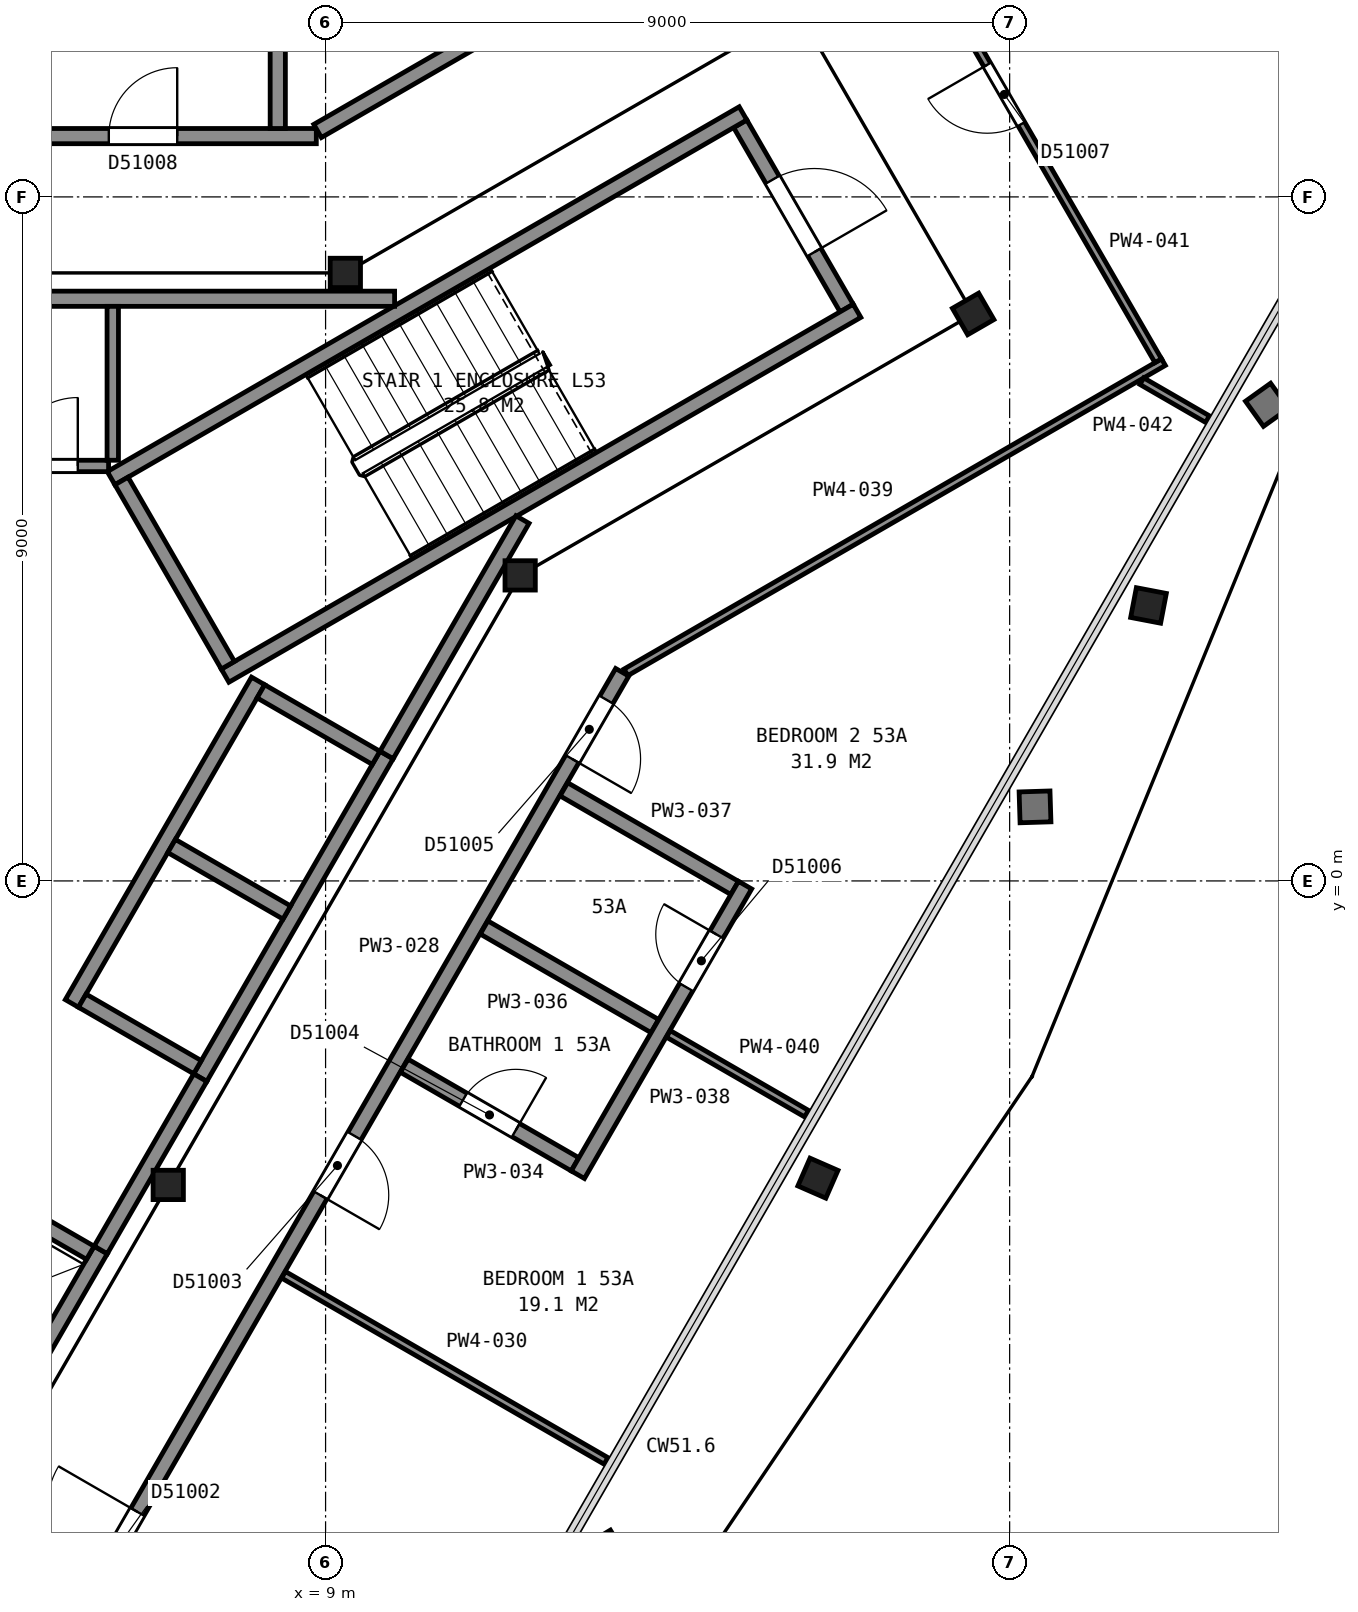
"""IFC4 building model, lengths in metres.
Left out: names, types, materials, properties, quantities, classifications, styles, units other than length and angle.
Written with IfcOpenShell. Run it as: python <this file> out.ifc"""

import sys

from ifc_helpers import new_model, si_unit, direction, frame, frame_2d, origin, origin_2d, place, context, subcontext, project, spatial, rectangle, i_section, extrude, element, fill, save


model = new_model("IFC4")
c1 = context("Model", 3, precision=1e-05, world=origin(), true_north=direction((0.0, 1.0)))
c2 = subcontext(c1, "Body", "Model", "MODEL_VIEW")
j1 = project(units=[si_unit("LENGTHUNIT", "METRE"), si_unit("PLANEANGLEUNIT", "RADIAN")], contexts=[c1])
p1 = place(None, origin())
s1 = spatial("IfcSite", under=j1, at=p1, CompositionType="ELEMENT")
p2 = place(p1, origin())
s2 = spatial("IfcBuilding", under=s1, at=p2, CompositionType="ELEMENT")
p3 = place(p2, frame((0.0, 0.0, 213.8)))
s3 = spatial("IfcBuildingStorey", under=s2, at=p3, CompositionType="ELEMENT", Elevation=213.8)
p4 = place(p3, frame((15.276, -3.823, 0.035), z_axis=(0.169909418079, -0.074413848602, 0.982646105566), x_axis=(-0.500226220169, -0.86564150205, 0.020940835345)))
e1 = element("IfcColumn", 1, at=p4, inside=s3, PredefinedType="COLUMN", context=c2, shape_type="SweptSolid", body=[
    extrude(i_section(OverallWidth=0.401, OverallDepth=0.399, WebThickness=0.025, FlangeThickness=0.04, FilletRadius=0.015, at=origin_2d()), origin(), (0.0, 0.0, 1.0), 3.694),
])
p5 = place(p3, frame((19.598, 3.668, 0.04), z_axis=(0.19341182923, -0.037095396991, 0.980416134015), x_axis=(-0.498932099925, -0.864144788984, 0.065730840066)))
e2 = element("IfcColumn", 2, at=p5, inside=s3, PredefinedType="COLUMN", context=c2, shape_type="SweptSolid", body=[
    extrude(i_section(OverallWidth=0.401, OverallDepth=0.399, WebThickness=0.025, FlangeThickness=0.04, FilletRadius=0.015, at=origin_2d()), origin(), (0.0, 0.0, 1.0), 3.692),
])
p6 = place(p3, frame((11.56, 4.02, 0.0), z_axis=(0.0, 0.0, 1.0), x_axis=(1.0, 0.0, 0.0)))
e3 = element("IfcColumn", 3, at=p6, inside=s3, PredefinedType="COLUMN", context=c2, shape_type="SweptSolid", body=[
    extrude(i_section(OverallWidth=0.399, OverallDepth=0.386, WebThickness=0.021, FlangeThickness=0.033, FilletRadius=0.015, at=origin_2d()), origin(), (0.0, 0.0, 1.0), 3.7),
])
p7 = place(p3, frame((17.52, 7.46, 0.0), z_axis=(0.0, 0.0, 1.0), x_axis=(0.5, -0.866025403784, 0.0)))
e4 = element("IfcColumn", 4, at=p7, inside=s3, PredefinedType="COLUMN", context=c2, shape_type="SweptSolid", body=[
    extrude(i_section(OverallWidth=0.401, OverallDepth=0.399, WebThickness=0.025, FlangeThickness=0.04, FilletRadius=0.015, at=origin_2d()), origin(), (0.0, 0.0, 1.0), 3.7),
])
for number, where, z_axis, x_axis in (
    (5, (9.26, 8.0, 0.0), (0.0, 0.0, 1.0), (1.0, 0.0, 0.0)),
    (6, (6.93, -4.0, 0.0), (0.0, 0.0, 1.0), (1.0, 0.0, 0.0)),
):
    element("IfcColumn", number, at=place(p3, frame(where, z_axis=z_axis, x_axis=x_axis)), inside=s3, PredefinedType="COLUMN", context=c2, shape_type="SweptSolid", body=[
        extrude(i_section(OverallWidth=0.399, OverallDepth=0.386, WebThickness=0.021, FlangeThickness=0.033, FilletRadius=0.015, at=origin_2d()), origin(), (0.0, 0.0, 1.0), 3.7),
    ])
p8 = place(p3, frame((15.855, 7.538, 0.0), z_axis=(0.0, 0.0, 1.0), x_axis=(-0.500049511043, 0.865996816683, 0.0)))
e7 = element("IfcWall", 7, at=p8, inside=s3, PredefinedType="PARTITIONING", context=c2, shape_type="SweptSolid", body=[
    extrude(rectangle(XDim=2.8, YDim=0.2, at=frame_2d((1.4, 0.0))), origin(), (0.0, 0.0, 1.0), 3.45),
])
p9 = place(p8, frame((0.85, 0.0, 0.0)))
e8 = element("IfcOpeningElement", 8, at=p9, cuts=e7, PredefinedType="OPENING", context=c2, shape_type="SweptSolid", body=[
    extrude(rectangle(XDim=1.1, YDim=2.1, at=frame_2d((0.55, 1.05))), frame((0.0, 0.11, 0.0), z_axis=(0.0, -1.0, 0.0), x_axis=(1.0, 0.0, 0.0)), (0.0, 0.0, 1.0), 0.22),
])
for number, where, z_axis, x_axis in (
    (9, (6.178, 5.299, 0.0), (0.0, 0.0, 1.0), (0.866, 0.5, 0.0)),
    (10, (7.678, 2.701, 0.0), (0.0, 0.0, 1.0), (0.866, 0.5, 0.0)),
):
    element("IfcWall", number, at=place(p3, frame(where, z_axis=z_axis, x_axis=x_axis)), inside=s3, PredefinedType="PARTITIONING", context=c2, shape_type="SweptSolid", body=[
        extrude(rectangle(XDim=9.6, YDim=0.2, at=frame_2d((4.8, 0.0))), origin(), (0.0, 0.0, 1.0), 3.45),
    ])
p10 = place(p3, frame((7.715, 2.838, 0.0), z_axis=(0.0, 0.0, 1.0), x_axis=(-0.500049511043, 0.865996816683, 0.0)))
e11 = element("IfcWall", 11, at=p10, inside=s3, PredefinedType="PARTITIONING", context=c2, shape_type="SweptSolid", body=[
    extrude(rectangle(XDim=2.8, YDim=0.2, at=frame_2d((1.4, 0.0))), origin(), (0.0, 0.0, 1.0), 3.45),
])
p11 = place(p3, frame((4.766, -7.065, 0.0), z_axis=(0.0, 0.0, 1.0), x_axis=(0.499948979701, 0.866054858364, 0.0)))
e12 = element("IfcWall", 12, at=p11, inside=s3, PredefinedType="PARTITIONING", context=c2, shape_type="SweptSolid", body=[
    extrude(rectangle(XDim=2.55, YDim=0.2, at=frame_2d((1.275, 0.0))), origin(), (0.0, 0.0, 1.0), 3.7),
])
p12 = place(p3, frame((7.351, -2.587, 0.0), z_axis=(0.0, 0.0, 1.0), x_axis=(0.500002801628, 0.866023786258, 0.0)))
e13 = element("IfcWall", 13, at=p12, inside=s3, PredefinedType="PARTITIONING", context=c2, shape_type="SweptSolid", body=[
    extrude(rectangle(XDim=4.9, YDim=0.2, at=frame_2d((2.45, 0.0))), origin(), (0.0, 0.0, 1.0), 3.7),
])
p13 = place(p3, frame((5.663, -1.612, 0.0), z_axis=(0.0, 0.0, 1.0), x_axis=(0.49998122708, 0.866036242063, 0.0)))
e14 = element("IfcWall", 14, at=p13, inside=s3, PredefinedType="PARTITIONING", context=c2, shape_type="SweptSolid", body=[
    extrude(rectangle(XDim=4.9, YDim=0.2, at=frame_2d((2.45, 0.0))), origin(), (0.0, 0.0, 1.0), 3.7),
])
p14 = place(p3, frame((9.665, 1.62, 0.0), z_axis=(0.0, 0.0, 1.0), x_axis=(-0.866002029911, 0.500040482552, 0.0)))
e15 = element("IfcWall", 15, at=p14, inside=s3, PredefinedType="PARTITIONING", context=c2, shape_type="SweptSolid", body=[
    extrude(rectangle(XDim=1.75, YDim=0.2, at=frame_2d((0.875, 0.0))), origin(), (0.0, 0.0, 1.0), 3.7),
])
for number, where, z_axis, x_axis in (
    (16, (8.49, -0.416, 0.0), (0.0, 0.0, 1.0), (-0.866, 0.5, 0.0)),
    (17, (7.315, -2.451, 0.0), (0.0, 0.0, 1.0), (-0.866, 0.5, 0.0)),
):
    element("IfcWall", number, at=place(p3, frame(where, z_axis=z_axis, x_axis=x_axis)), inside=s3, PredefinedType="PARTITIONING", context=c2, shape_type="SweptSolid", body=[
        extrude(rectangle(XDim=1.75, YDim=0.2, at=frame_2d((0.875, 0.0))), origin(), (0.0, 0.0, 1.0), 3.7),
    ])
p15 = place(p3, frame((5.905, -4.893, 0.0), z_axis=(0.0, 0.0, 1.0), x_axis=(-0.866002029911, 0.500040482552, 0.0)))
e18 = element("IfcWall", 18, at=p15, inside=s3, PredefinedType="PARTITIONING", context=c2, shape_type="SweptSolid", body=[
    extrude(rectangle(XDim=1.75, YDim=0.2, at=frame_2d((0.875, 0.0))), origin(), (0.0, 0.0, 1.0), 3.7),
])
p16 = place(p3, frame((-3.933, 7.66, 0.0), z_axis=(0.0, 0.0, 1.0), x_axis=(1.0, 0.0, 0.0)))
e19 = element("IfcWall", 19, at=p16, inside=s3, PredefinedType="PARTITIONING", context=c2, shape_type="SweptSolid", body=[
    extrude(rectangle(XDim=13.841, YDim=0.2, at=frame_2d((6.92, 0.0))), origin(), (0.0, 0.0, 1.0), 3.45),
])
p17 = place(p3, frame((0.925, 5.46, 0.0), z_axis=(0.0, 0.0, 1.0), x_axis=(1.0, 0.0, 0.0)))
e20 = element("IfcWall", 20, at=p17, inside=s3, PredefinedType="PARTITIONING", context=c2, shape_type="SweptSolid", body=[
    extrude(rectangle(XDim=5.22, YDim=0.15, at=frame_2d((2.61, 0.0))), origin(), (0.0, 0.0, 1.0), 3.45),
])
p18 = place(p17, frame((3.915, 0.0, 0.0)))
e21 = element("IfcOpeningElement", 21, at=p18, cuts=e20, PredefinedType="OPENING", context=c2, shape_type="SweptSolid", body=[
    extrude(rectangle(XDim=0.9, YDim=2.1, at=frame_2d((0.45, 1.05))), frame((0.0, 0.085, 0.0), z_axis=(0.0, -1.0, 0.0), x_axis=(1.0, 0.0, 0.0)), (0.0, 0.0, 1.0), 0.17),
])
p19 = place(p3, frame((6.042, -4.855, 0.0), z_axis=(0.0, 0.0, 1.0), x_axis=(0.500252727967, 0.865879442048, 0.0)))
e22 = element("IfcWall", 22, at=p19, inside=s3, PredefinedType="PARTITIONING", context=c2, shape_type="SweptSolid", body=[
    extrude(rectangle(XDim=2.617, YDim=0.2, at=frame_2d((1.309, 0.0))), origin(), (0.0, 0.0, 1.0), 3.45),
])
p20 = place(p3, frame((6.2, 5.535, 0.0), z_axis=(0.0, 0.0, 1.0), x_axis=(0.0, 1.0, 0.0)))
e23 = element("IfcWall", 23, at=p20, inside=s3, PredefinedType="PARTITIONING", context=c2, shape_type="SweptSolid", body=[
    extrude(rectangle(XDim=2.025, YDim=0.15, at=frame_2d((1.013, 0.0))), origin(), (0.0, 0.0, 1.0), 3.45),
])
p21 = place(p3, frame((9.803, 1.658, 0.0), z_axis=(0.0, 0.0, 1.0), x_axis=(0.499943114462, 0.866058244174, 0.0)))
e24 = element("IfcWall", 24, at=p21, inside=s3, PredefinedType="PARTITIONING", context=c2, shape_type="SweptSolid", body=[
    extrude(rectangle(XDim=3.576, YDim=0.2, at=frame_2d((1.788, 0.0))), origin(), (0.0, 0.0, 1.0), 3.45),
])
p22 = place(p3, frame((-8.828, 9.8, 0.0), z_axis=(0.0, 0.0, 1.0), x_axis=(1.0, 0.0, 0.0)))
e25 = element("IfcWall", 25, at=p22, inside=s3, PredefinedType="PARTITIONING", context=c2, shape_type="SweptSolid", body=[
    extrude(rectangle(XDim=17.706, YDim=0.2, at=frame_2d((8.853, 0.0))), origin(), (0.0, 0.0, 1.0), 2.713),
])
p23 = place(p22, frame((14.976, 0.0, 0.0)))
e26 = element("IfcOpeningElement", 26, at=p23, cuts=e25, PredefinedType="OPENING", context=c2, shape_type="SweptSolid", body=[
    extrude(rectangle(XDim=0.9, YDim=2.1, at=frame_2d((0.45, 1.05))), frame((0.0, 0.11, 0.0), z_axis=(0.0, -1.0, 0.0), x_axis=(1.0, 0.0, 0.0)), (0.0, 0.0, 1.0), 0.22),
])
p24 = place(p22, frame((10.673, 0.0, 0.0)))
e27 = element("IfcOpeningElement", 27, at=p24, cuts=e25, PredefinedType="OPENING", context=c2, shape_type="SweptSolid", body=[
    extrude(rectangle(XDim=0.9, YDim=2.1, at=frame_2d((0.45, 1.05))), frame((0.0, 0.11, 0.0), z_axis=(0.0, -1.0, 0.0), x_axis=(1.0, 0.0, 0.0)), (0.0, 0.0, 1.0), 0.22),
])
p25 = place(p22, frame((5.57, 0.0, 0.0)))
e28 = element("IfcOpeningElement", 28, at=p25, cuts=e25, PredefinedType="OPENING", context=c2, shape_type="SweptSolid", body=[
    extrude(rectangle(XDim=0.9, YDim=2.1, at=frame_2d((0.45, 1.05))), frame((0.0, 0.11, 0.0), z_axis=(0.0, -1.0, 0.0), x_axis=(1.0, 0.0, 0.0)), (0.0, 0.0, 1.0), 0.22),
])
p26 = place(p22, frame((1.3, 0.0, 0.0)))
e29 = element("IfcOpeningElement", 29, at=p26, cuts=e25, PredefinedType="OPENING", context=c2, shape_type="SweptSolid", body=[
    extrude(rectangle(XDim=0.9, YDim=2.1, at=frame_2d((0.45, 1.05))), frame((0.0, 0.11, 0.0), z_axis=(0.0, -1.0, 0.0), x_axis=(1.0, 0.0, 0.0)), (0.0, 0.0, 1.0), 0.22),
])
p27 = place(p3, frame((12.903, 2.745, 0.0), z_axis=(0.0, 0.0, 1.0), x_axis=(-0.499999743747, -0.866025551732, 0.0)))
e30 = element("IfcWall", 30, at=p27, inside=s3, PredefinedType="PARTITIONING", context=c2, shape_type="SweptSolid", body=[
    extrude(rectangle(XDim=17.656, YDim=0.2, at=frame_2d((8.828, 0.0))), origin(), (0.0, 0.0, 1.0), 2.713),
])
p28 = place(p27, frame((12.756, 0.0, 0.0)))
e31 = element("IfcOpeningElement", 31, at=p28, cuts=e30, PredefinedType="OPENING", context=c2, shape_type="SweptSolid", body=[
    extrude(rectangle(XDim=1.2, YDim=2.1, at=frame_2d((0.6, 1.05))), frame((0.0, 0.11, 0.0), z_axis=(0.0, -1.0, 0.0), x_axis=(1.0, 0.0, 0.0)), (0.0, 0.0, 1.0), 0.22),
])
p29 = place(p27, frame((7.044, 0.0, 0.0)))
e32 = element("IfcOpeningElement", 32, at=p29, cuts=e30, PredefinedType="OPENING", context=c2, shape_type="SweptSolid", body=[
    extrude(rectangle(XDim=0.9, YDim=2.1, at=frame_2d((0.45, 1.05))), frame((0.0, 0.11, 0.0), z_axis=(0.0, -1.0, 0.0), x_axis=(1.0, 0.0, 0.0)), (0.0, 0.0, 1.0), 0.22),
])
p30 = place(p27, frame((0.417, 0.0, 0.0)))
e33 = element("IfcOpeningElement", 33, at=p30, cuts=e30, PredefinedType="OPENING", context=c2, shape_type="SweptSolid", body=[
    extrude(rectangle(XDim=0.9, YDim=2.1, at=frame_2d((0.45, 1.05))), frame((0.0, 0.11, 0.0), z_axis=(0.0, -1.0, 0.0), x_axis=(1.0, 0.0, 0.0)), (0.0, 0.0, 1.0), 0.22),
])
p31 = place(p3, frame((8.447, -5.182, 0.0), z_axis=(0.0, 0.0, 1.0), x_axis=(0.866106755222, -0.499859068697, 0.0)))
e34 = element("IfcWall", 34, at=p31, inside=s3, PredefinedType="PARTITIONING", context=c2, shape_type="SweptSolid", body=[
    extrude(rectangle(XDim=4.899, YDim=0.1, at=frame_2d((2.449, 0.0))), origin(), (0.0, 0.0, 1.0), 2.713),
])
p32 = place(p3, frame((8.371, 13.129, 0.0), z_axis=(0.0, 0.0, 1.0), x_axis=(0.0, -1.0, 0.0)))
e35 = element("IfcWall", 35, at=p32, inside=s3, PredefinedType="PARTITIONING", context=c2, shape_type="SweptSolid", body=[
    extrude(rectangle(XDim=3.229, YDim=0.2, at=frame_2d((1.615, 0.0))), origin(), (0.0, 0.0, 1.0), 2.713),
])
p33 = place(p32, frame((1.329, 0.0, 0.0)))
e36 = element("IfcOpeningElement", 36, at=p33, cuts=e35, PredefinedType="OPENING", context=c2, shape_type="SweptSolid", body=[
    extrude(rectangle(XDim=0.8, YDim=2.1, at=frame_2d((0.4, 1.05))), frame((0.0, 0.11, 0.0), z_axis=(0.0, -1.0, 0.0), x_axis=(1.0, 0.0, 0.0)), (0.0, 0.0, 1.0), 0.22),
])
p34 = place(p3, frame((8.895, 9.867, 0.0), z_axis=(0.0, 0.0, 1.0), x_axis=(0.866079355551, 0.499906541154, 0.0)))
e37 = element("IfcWall", 37, at=p34, inside=s3, PredefinedType="PARTITIONING", context=c2, shape_type="SweptSolid", body=[
    extrude(rectangle(XDim=8.113, YDim=0.2, at=frame_2d((4.056, 0.0))), origin(), (0.0, 0.0, 1.0), 2.713),
])
p35 = place(p3, frame((10.035, -2.431, 0.0), z_axis=(0.0, 0.0, 1.0), x_axis=(0.866028930478, -0.499993891537, 0.0)))
e38 = element("IfcWall", 38, at=p35, inside=s3, PredefinedType="PARTITIONING", context=c2, shape_type="SweptSolid", body=[
    extrude(rectangle(XDim=2.595, YDim=0.2, at=frame_2d((1.298, 0.0))), origin(), (0.0, 0.0, 1.0), 2.713),
])
p36 = place(p35, frame((0.895, 0.0, 0.0)))
e39 = element("IfcOpeningElement", 39, at=p36, cuts=e38, PredefinedType="OPENING", context=c2, shape_type="SweptSolid", body=[
    extrude(rectangle(XDim=0.8, YDim=2.1, at=frame_2d((0.4, 1.05))), frame((0.0, 0.11, 0.0), z_axis=(0.0, -1.0, 0.0), x_axis=(1.0, 0.0, 0.0)), (0.0, 0.0, 1.0), 0.22),
])
for number, where, z_axis, x_axis in (
    (40, (11.085, -0.613, 0.0), (0.0, 0.0, 1.0), (0.866, -0.5, 0.0)),
    (41, (12.135, 1.206, 0.0), (0.0, 0.0, 1.0), (0.866, -0.5, 0.0)),
):
    element("IfcWall", number, at=place(p3, frame(where, z_axis=z_axis, x_axis=x_axis)), inside=s3, PredefinedType="PARTITIONING", context=c2, shape_type="SweptSolid", body=[
        extrude(rectangle(XDim=2.595, YDim=0.2, at=frame_2d((1.297, 0.0))), origin(), (0.0, 0.0, 1.0), 2.713),
    ])
p37 = place(p3, frame((12.319, -3.866, 0.0), z_axis=(0.0, 0.0, 1.0), x_axis=(0.50001224981, 0.866018331238, 0.0)))
e42 = element("IfcWall", 42, at=p37, inside=s3, PredefinedType="PARTITIONING", context=c2, shape_type="SweptSolid", body=[
    extrude(rectangle(XDim=4.4, YDim=0.2, at=frame_2d((2.2, 0.0))), origin(), (0.0, 0.0, 1.0), 2.713),
])
p38 = place(p37, frame((2.85, 0.0, 0.0)))
e43 = element("IfcOpeningElement", 43, at=p38, cuts=e42, PredefinedType="OPENING", context=c2, shape_type="SweptSolid", body=[
    extrude(rectangle(XDim=0.8, YDim=2.1, at=frame_2d((0.4, 1.05))), frame((0.0, 0.11, 0.0), z_axis=(0.0, -1.0, 0.0), x_axis=(1.0, 0.0, 0.0)), (0.0, 0.0, 1.0), 0.22),
])
p39 = place(p3, frame((12.952, 2.744, 0.0), z_axis=(0.0, 0.0, 1.0), x_axis=(0.86608949446, 0.499888975259, 0.0)))
e44 = element("IfcWall", 44, at=p39, inside=s3, PredefinedType="PARTITIONING", context=c2, shape_type="SweptSolid", body=[
    extrude(rectangle(XDim=8.165, YDim=0.1, at=frame_2d((4.083, 0.0))), origin(), (0.0, 0.0, 1.0), 2.713),
])
p40 = place(p3, frame((13.51, -2.012, 0.0), z_axis=(0.0, 0.0, 1.0), x_axis=(0.866022890907, -0.500004352405, 0.0)))
e45 = element("IfcWall", 45, at=p40, inside=s3, PredefinedType="PARTITIONING", context=c2, shape_type="SweptSolid", body=[
    extrude(rectangle(XDim=2.099, YDim=0.1, at=frame_2d((1.05, 0.0))), origin(), (0.0, 0.0, 1.0), 2.713),
])
p41 = place(p3, frame((15.928, 13.812, 0.0), z_axis=(0.0, 0.0, 1.0), x_axis=(0.500422653123, -0.865781247337, 0.0)))
e46 = element("IfcWall", 46, at=p41, inside=s3, PredefinedType="PARTITIONING", context=c2, shape_type="SweptSolid", body=[
    extrude(rectangle(XDim=8.047, YDim=0.1, at=frame_2d((4.024, 0.0))), origin(), (0.0, 0.0, 1.0), 2.713),
])
p42 = place(p41, frame((3.55, 0.0, 0.0)))
e47 = element("IfcOpeningElement", 47, at=p42, cuts=e46, PredefinedType="OPENING", context=c2, shape_type="SweptSolid", body=[
    extrude(rectangle(XDim=0.9, YDim=2.1, at=frame_2d((0.45, 1.05))), frame((0.0, 0.06, 0.0), z_axis=(0.0, -1.0, 0.0), x_axis=(1.0, 0.0, 0.0)), (0.0, 0.0, 1.0), 0.12),
])
p43 = place(p3, frame((19.739, 6.576, 0.0), z_axis=(0.0, 0.0, 1.0), x_axis=(0.865855657918, -0.500293893279, 0.0)))
e48 = element("IfcWall", 48, at=p43, inside=s3, PredefinedType="PARTITIONING", context=c2, shape_type="SweptSolid", body=[
    extrude(rectangle(XDim=0.999, YDim=0.1, at=frame_2d((0.499, 0.0))), origin(), (0.0, 0.0, 1.0), 2.713),
])
p44 = place(p9, origin())
e49 = element("IfcDoor", 49, at=p44, inside=s3, OperationType="SINGLE_SWING_LEFT", PredefinedType="DOOR", context=c2, shape_type="SweptSolid", body=[
    extrude(rectangle(XDim=1.1, YDim=2.1, at=frame_2d((0.55, 1.05))), frame((0.0, 0.025, 0.0), z_axis=(0.0, -1.0, 0.0), x_axis=(1.0, 0.0, 0.0)), (0.0, 0.0, 1.0), 0.05),
])
fill(e8, e49)
p45 = place(p18, origin())
e50 = element("IfcDoor", 50, at=p45, inside=s3, OperationType="SINGLE_SWING_RIGHT", PredefinedType="DOOR", context=c2, shape_type="SweptSolid", body=[
    extrude(rectangle(XDim=0.9, YDim=2.1, at=frame_2d((0.45, 1.05))), frame((0.0, 0.025, 0.0), z_axis=(0.0, -1.0, 0.0), x_axis=(1.0, 0.0, 0.0)), (0.0, 0.0, 1.0), 0.05),
])
fill(e21, e50)
p46 = place(p23, origin())
e51 = element("IfcDoor", 51, at=p46, inside=s3, OperationType="SINGLE_SWING_RIGHT", PredefinedType="DOOR", context=c2, shape_type="SweptSolid", body=[
    extrude(rectangle(XDim=0.9, YDim=2.1, at=frame_2d((0.45, 1.05))), frame((0.0, 0.025, 0.0), z_axis=(0.0, -1.0, 0.0), x_axis=(1.0, 0.0, 0.0)), (0.0, 0.0, 1.0), 0.05),
])
fill(e26, e51)
p47 = place(p28, origin())
e52 = element("IfcDoor", 52, at=p47, inside=s3, OperationType="SINGLE_SWING_LEFT", PredefinedType="DOOR", context=c2, shape_type="SweptSolid", body=[
    extrude(rectangle(XDim=1.2, YDim=2.1, at=frame_2d((0.6, 1.05))), frame((0.0, 0.025, 0.0), z_axis=(0.0, -1.0, 0.0), x_axis=(1.0, 0.0, 0.0)), (0.0, 0.0, 1.0), 0.05),
])
fill(e31, e52)
p48 = place(p29, origin())
e53 = element("IfcDoor", 53, at=p48, inside=s3, OperationType="SINGLE_SWING_RIGHT", PredefinedType="DOOR", context=c2, shape_type="SweptSolid", body=[
    extrude(rectangle(XDim=0.9, YDim=2.1, at=frame_2d((0.45, 1.05))), frame((0.0, 0.025, 0.0), z_axis=(0.0, -1.0, 0.0), x_axis=(1.0, 0.0, 0.0)), (0.0, 0.0, 1.0), 0.05),
])
fill(e32, e53)
p49 = place(p30, origin())
e54 = element("IfcDoor", 54, at=p49, inside=s3, OperationType="SINGLE_SWING_RIGHT", PredefinedType="DOOR", context=c2, shape_type="SweptSolid", body=[
    extrude(rectangle(XDim=0.9, YDim=2.1, at=frame_2d((0.45, 1.05))), frame((0.0, 0.025, 0.0), z_axis=(0.0, -1.0, 0.0), x_axis=(1.0, 0.0, 0.0)), (0.0, 0.0, 1.0), 0.05),
])
fill(e33, e54)
p50 = place(p36, origin())
e55 = element("IfcDoor", 55, at=p50, inside=s3, OperationType="SINGLE_SWING_RIGHT", PredefinedType="DOOR", context=c2, shape_type="SweptSolid", body=[
    extrude(rectangle(XDim=0.8, YDim=2.1, at=frame_2d((0.4, 1.05))), frame((0.0, 0.025, 0.0), z_axis=(0.0, -1.0, 0.0), x_axis=(1.0, 0.0, 0.0)), (0.0, 0.0, 1.0), 0.05),
])
fill(e39, e55)
p51 = place(p38, origin())
e56 = element("IfcDoor", 56, at=p51, inside=s3, OperationType="SINGLE_SWING_RIGHT", PredefinedType="DOOR", context=c2, shape_type="SweptSolid", body=[
    extrude(rectangle(XDim=0.8, YDim=2.1, at=frame_2d((0.4, 1.05))), frame((0.0, 0.025, 0.0), z_axis=(0.0, -1.0, 0.0), x_axis=(1.0, 0.0, 0.0)), (0.0, 0.0, 1.0), 0.05),
])
fill(e43, e56)
p52 = place(p42, origin())
e57 = element("IfcDoor", 57, at=p52, inside=s3, OperationType="SINGLE_SWING_LEFT", PredefinedType="DOOR", context=c2, shape_type="SweptSolid", body=[
    extrude(rectangle(XDim=0.9, YDim=2.1, at=frame_2d((0.45, 1.05))), frame((0.0, 0.025, 0.0), z_axis=(0.0, -1.0, 0.0), x_axis=(1.0, 0.0, 0.0)), (0.0, 0.0, 1.0), 0.05),
])
fill(e47, e57)
save(model, sys.argv[1])
